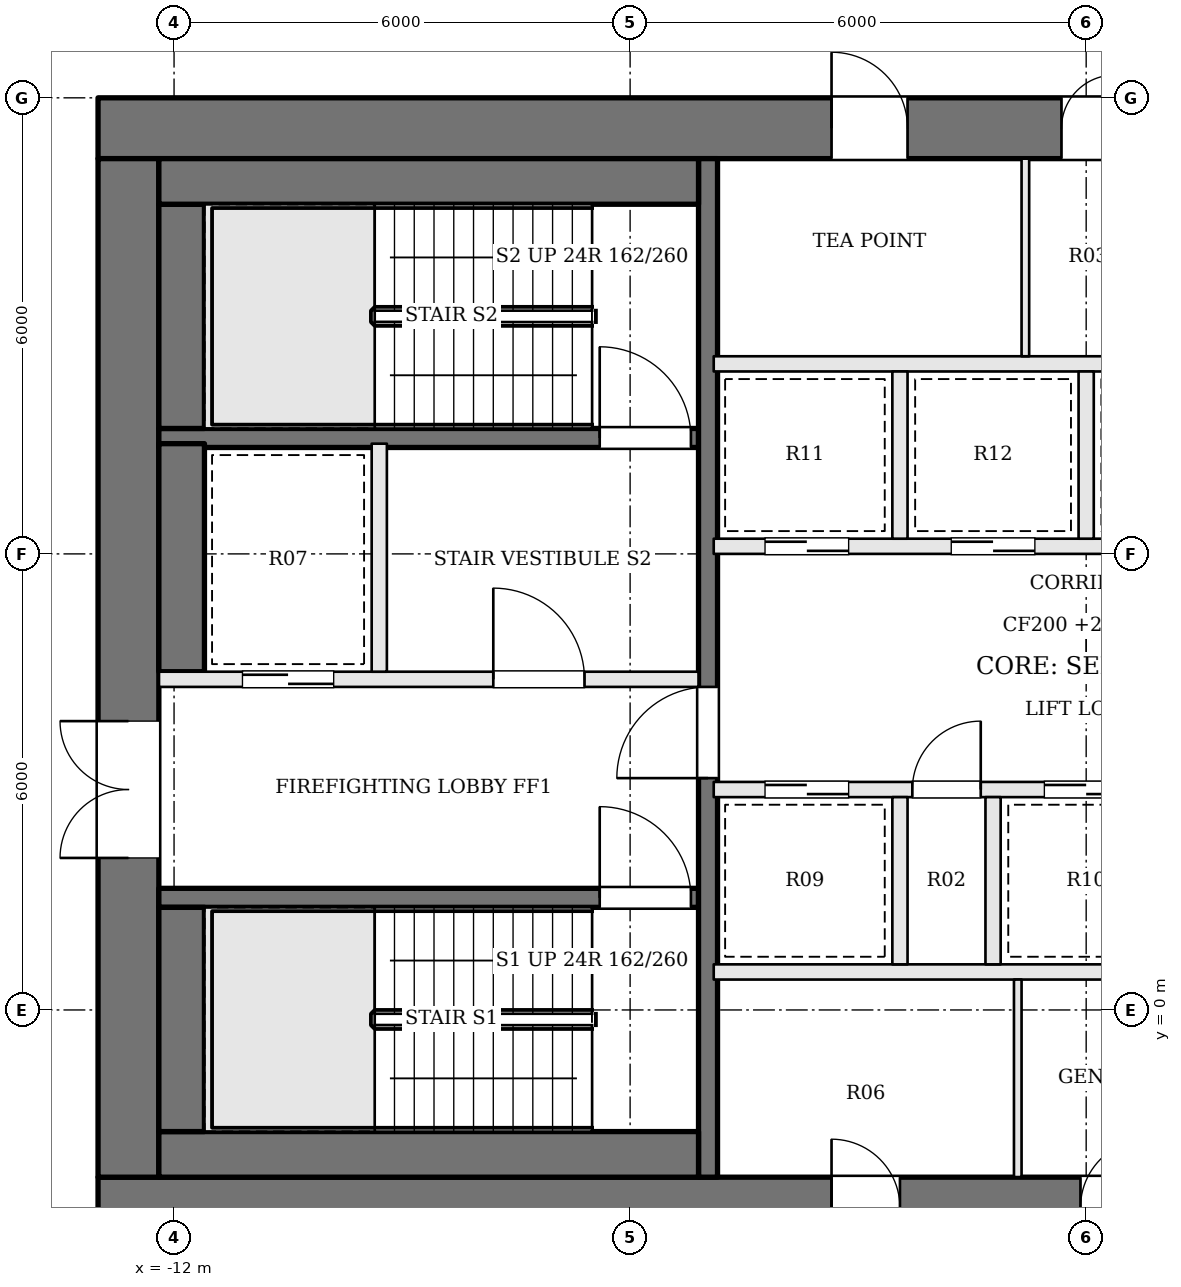
"""IFC4 building model, lengths in metres.
Left out: names, types, materials, properties, quantities, classifications, styles, units other than length and angle.
Written with IfcOpenShell. Run it as: python <this file> out.ifc"""

import sys

from ifc_helpers import new_model, si_unit, direction, frame, frame_2d, origin, place, context, subcontext, project, spatial, rectangle, extrude, element, fill, save


model = new_model("IFC4")
c1 = context("Model", 3, precision=1e-05, world=origin(), true_north=direction((0.0, 1.0)))
c2 = subcontext(c1, "Body", "Model", "MODEL_VIEW")
j1 = project(units=[si_unit("LENGTHUNIT", "METRE"), si_unit("PLANEANGLEUNIT", "RADIAN")], contexts=[c1])
p1 = place(None, origin())
s1 = spatial("IfcSite", under=j1, at=p1, CompositionType="ELEMENT")
p2 = place(p1, origin())
s2 = spatial("IfcBuilding", under=s1, at=p2, CompositionType="ELEMENT")
p3 = place(p2, frame((0.0, 0.0, 252.6)))
s3 = spatial("IfcBuildingStorey", under=s2, at=p3, CompositionType="ELEMENT", Elevation=252.6)
p4 = place(p3, frame((-13.0, 11.6, 0.0), z_axis=(0.0, 0.0, 1.0), x_axis=(1.0, 0.0, 0.0)))
e1 = element("IfcWall", 1, at=p4, inside=s3, PredefinedType="SHEAR", context=c2, shape_type="SweptSolid", body=[
    extrude(rectangle(XDim=26.0, YDim=0.8, at=frame_2d((13.0, 0.0))), origin(), (0.0, 0.0, 1.0), 3.9),
])
p5 = place(p4, frame((9.65, 0.0, 0.0)))
e2 = element("IfcOpeningElement", 2, at=p5, cuts=e1, PredefinedType="OPENING", context=c2, shape_type="SweptSolid", body=[
    extrude(rectangle(XDim=1.0, YDim=2.1, at=frame_2d((0.5, 1.05))), frame((0.0, 0.41, 0.0), z_axis=(0.0, -1.0, 0.0), x_axis=(1.0, 0.0, 0.0)), (0.0, 0.0, 1.0), 0.82),
])
p6 = place(p4, frame((12.675, 0.0, 0.0)))
e3 = element("IfcOpeningElement", 3, at=p6, cuts=e1, PredefinedType="OPENING", context=c2, shape_type="SweptSolid", body=[
    extrude(rectangle(XDim=0.7, YDim=2.1, at=frame_2d((0.35, 1.05))), frame((0.0, 0.41, 0.0), z_axis=(0.0, -1.0, 0.0), x_axis=(1.0, 0.0, 0.0)), (0.0, 0.0, 1.0), 0.82),
])
p7 = place(p4, frame((14.725, 0.0, 0.0)))
e4 = element("IfcOpeningElement", 4, at=p7, cuts=e1, PredefinedType="OPENING", context=c2, shape_type="SweptSolid", body=[
    extrude(rectangle(XDim=0.7, YDim=2.1, at=frame_2d((0.35, 1.05))), frame((0.0, 0.41, 0.0), z_axis=(0.0, -1.0, 0.0), x_axis=(1.0, 0.0, 0.0)), (0.0, 0.0, 1.0), 0.82),
])
p8 = place(p4, frame((16.6, 0.0, 0.0)))
e5 = element("IfcOpeningElement", 5, at=p8, cuts=e1, PredefinedType="OPENING", context=c2, shape_type="SweptSolid", body=[
    extrude(rectangle(XDim=1.0, YDim=2.1, at=frame_2d((0.5, 1.05))), frame((0.0, 0.41, 0.0), z_axis=(0.0, -1.0, 0.0), x_axis=(1.0, 0.0, 0.0)), (0.0, 0.0, 1.0), 0.82),
])
p9 = place(p3, frame((-13.0, -2.6, 0.0), z_axis=(0.0, 0.0, 1.0), x_axis=(1.0, 0.0, 0.0)))
e6 = element("IfcWall", 6, at=p9, inside=s3, PredefinedType="SHEAR", context=c2, shape_type="SweptSolid", body=[
    extrude(rectangle(XDim=26.0, YDim=0.8, at=frame_2d((13.0, 0.0))), origin(), (0.0, 0.0, 1.0), 3.9),
])
p10 = place(p9, frame((9.65, 0.0, 0.0)))
e7 = element("IfcOpeningElement", 7, at=p10, cuts=e6, PredefinedType="OPENING", context=c2, shape_type="SweptSolid", body=[
    extrude(rectangle(XDim=0.9, YDim=2.1, at=frame_2d((0.45, 1.05))), frame((0.0, 0.41, 0.0), z_axis=(0.0, -1.0, 0.0), x_axis=(1.0, 0.0, 0.0)), (0.0, 0.0, 1.0), 0.82),
])
p11 = place(p9, frame((12.925, 0.0, 0.0)))
e8 = element("IfcOpeningElement", 8, at=p11, cuts=e6, PredefinedType="OPENING", context=c2, shape_type="SweptSolid", body=[
    extrude(rectangle(XDim=0.9, YDim=2.1, at=frame_2d((0.45, 1.05))), frame((0.0, 0.41, 0.0), z_axis=(0.0, -1.0, 0.0), x_axis=(1.0, 0.0, 0.0)), (0.0, 0.0, 1.0), 0.82),
])
p12 = place(p9, frame((15.05, 0.0, 0.0)))
e9 = element("IfcOpeningElement", 9, at=p12, cuts=e6, PredefinedType="OPENING", context=c2, shape_type="SweptSolid", body=[
    extrude(rectangle(XDim=1.0, YDim=2.1, at=frame_2d((0.5, 1.05))), frame((0.0, 0.41, 0.0), z_axis=(0.0, -1.0, 0.0), x_axis=(1.0, 0.0, 0.0)), (0.0, 0.0, 1.0), 0.82),
])
p13 = place(p9, frame((16.825, 0.0, 0.0)))
e10 = element("IfcOpeningElement", 10, at=p13, cuts=e6, PredefinedType="OPENING", context=c2, shape_type="SweptSolid", body=[
    extrude(rectangle(XDim=0.7, YDim=2.1, at=frame_2d((0.35, 1.05))), frame((0.0, 0.41, 0.0), z_axis=(0.0, -1.0, 0.0), x_axis=(1.0, 0.0, 0.0)), (0.0, 0.0, 1.0), 0.82),
])
p14 = place(p3, frame((-12.6, -2.2, 0.0), z_axis=(0.0, 0.0, 1.0), x_axis=(0.0, 1.0, 0.0)))
e11 = element("IfcWall", 11, at=p14, inside=s3, PredefinedType="SHEAR", context=c2, shape_type="SweptSolid", body=[
    extrude(rectangle(XDim=13.4, YDim=0.8, at=frame_2d((6.7, 0.0))), origin(), (0.0, 0.0, 1.0), 3.9),
])
p15 = place(p14, frame((4.2, 0.0, 0.0)))
e12 = element("IfcOpeningElement", 12, at=p15, cuts=e11, PredefinedType="OPENING", context=c2, shape_type="SweptSolid", body=[
    extrude(rectangle(XDim=1.8, YDim=2.1, at=frame_2d((0.9, 1.05))), frame((0.0, 0.41, 0.0), z_axis=(0.0, -1.0, 0.0), x_axis=(1.0, 0.0, 0.0)), (0.0, 0.0, 1.0), 0.82),
])
p16 = place(p3, frame((-12.2, 1.475, 0.0), z_axis=(0.0, 0.0, 1.0), x_axis=(1.0, 0.0, 0.0)))
e13 = element("IfcWall", 13, at=p16, inside=s3, PredefinedType="SOLIDWALL", context=c2, shape_type="SweptSolid", body=[
    extrude(rectangle(XDim=7.1, YDim=0.25, at=frame_2d((3.55, 0.0))), origin(), (0.0, 0.0, 1.0), 3.7),
])
p17 = place(p16, frame((5.8, 0.0, 0.0)))
e14 = element("IfcOpeningElement", 14, at=p17, cuts=e13, PredefinedType="OPENING", context=c2, shape_type="SweptSolid", body=[
    extrude(rectangle(XDim=1.2, YDim=2.1, at=frame_2d((0.6, 1.05))), frame((0.0, 0.135, 0.0), z_axis=(0.0, -1.0, 0.0), x_axis=(1.0, 0.0, 0.0)), (0.0, 0.0, 1.0), 0.27),
])
p18 = place(p3, frame((-12.2, 4.35, 0.0), z_axis=(0.0, 0.0, 1.0), x_axis=(1.0, 0.0, 0.0)))
e15 = element("IfcWall", 15, at=p18, inside=s3, PredefinedType="SOLIDWALL", context=c2, shape_type="SweptSolid", body=[
    extrude(rectangle(XDim=7.1, YDim=0.2, at=frame_2d((3.55, 0.0))), origin(), (0.0, 0.0, 1.0), 3.7),
])
p19 = place(p18, frame((4.4, 0.0, 0.0)))
e16 = element("IfcOpeningElement", 16, at=p19, cuts=e15, PredefinedType="OPENING", context=c2, shape_type="SweptSolid", body=[
    extrude(rectangle(XDim=1.2, YDim=2.1, at=frame_2d((0.6, 1.05))), frame((0.0, 0.11, 0.0), z_axis=(0.0, -1.0, 0.0), x_axis=(1.0, 0.0, 0.0)), (0.0, 0.0, 1.0), 0.22),
])
p20 = place(p18, frame((1.1, 0.0, 0.0)))
e17 = element("IfcOpeningElement", 17, at=p20, cuts=e15, PredefinedType="OPENING", context=c2, shape_type="SweptSolid", body=[
    extrude(rectangle(XDim=1.2, YDim=2.1, at=frame_2d((0.6, 1.05))), frame((0.0, 0.11, 0.0), z_axis=(0.0, -1.0, 0.0), x_axis=(1.0, 0.0, 0.0)), (0.0, 0.0, 1.0), 0.22),
])
p21 = place(p3, frame((-12.2, 7.525, 0.0), z_axis=(0.0, 0.0, 1.0), x_axis=(1.0, 0.0, 0.0)))
e18 = element("IfcWall", 18, at=p21, inside=s3, PredefinedType="SOLIDWALL", context=c2, shape_type="SweptSolid", body=[
    extrude(rectangle(XDim=7.1, YDim=0.25, at=frame_2d((3.55, 0.0))), origin(), (0.0, 0.0, 1.0), 3.7),
])
p22 = place(p21, frame((5.8, 0.0, 0.0)))
e19 = element("IfcOpeningElement", 19, at=p22, cuts=e18, PredefinedType="OPENING", context=c2, shape_type="SweptSolid", body=[
    extrude(rectangle(XDim=1.2, YDim=2.1, at=frame_2d((0.6, 1.05))), frame((0.0, 0.135, 0.0), z_axis=(0.0, -1.0, 0.0), x_axis=(1.0, 0.0, 0.0)), (0.0, 0.0, 1.0), 0.27),
])
p23 = place(p3, frame((-9.3, 4.45, 0.0), z_axis=(0.0, 0.0, 1.0), x_axis=(0.0, 1.0, 0.0)))
e20 = element("IfcWall", 20, at=p23, inside=s3, PredefinedType="SOLIDWALL", context=c2, shape_type="SweptSolid", body=[
    extrude(rectangle(XDim=3.0, YDim=0.2, at=frame_2d((1.5, 0.0))), origin(), (0.0, 0.0, 1.0), 3.7),
])
p24 = place(p3, frame((-4.975, -2.2, 0.0), z_axis=(0.0, 0.0, 1.0), x_axis=(0.0, 1.0, 0.0)))
e21 = element("IfcWall", 21, at=p24, inside=s3, PredefinedType="SOLIDWALL", context=c2, shape_type="SweptSolid", body=[
    extrude(rectangle(XDim=13.4, YDim=0.25, at=frame_2d((6.7, 0.0))), origin(), (0.0, 0.0, 1.0), 3.7),
])
p25 = place(p24, frame((5.25, 0.0, 0.0)))
e22 = element("IfcOpeningElement", 22, at=p25, cuts=e21, PredefinedType="OPENING", context=c2, shape_type="SweptSolid", body=[
    extrude(rectangle(XDim=1.2, YDim=2.1, at=frame_2d((0.6, 1.05))), frame((0.0, 0.135, 0.0), z_axis=(0.0, -1.0, 0.0), x_axis=(1.0, 0.0, 0.0)), (0.0, 0.0, 1.0), 0.27),
])
p26 = place(p3, frame((-12.2, -1.9, 0.0), z_axis=(0.0, 0.0, 1.0), x_axis=(1.0, 0.0, 0.0)))
e23 = element("IfcWall", 23, at=p26, inside=s3, PredefinedType="SOLIDWALL", context=c2, shape_type="SweptSolid", body=[
    extrude(rectangle(XDim=7.1, YDim=0.6, at=frame_2d((3.55, 0.0))), origin(), (0.0, 0.0, 1.0), 3.7),
])
p27 = place(p3, frame((-11.9, -1.6, 0.0), z_axis=(0.0, 0.0, 1.0), x_axis=(0.0, 1.0, 0.0)))
e24 = element("IfcWall", 24, at=p27, inside=s3, PredefinedType="SOLIDWALL", context=c2, shape_type="SweptSolid", body=[
    extrude(rectangle(XDim=2.95, YDim=0.6, at=frame_2d((1.475, 0.0))), origin(), (0.0, 0.0, 1.0), 3.7),
])
p28 = place(p3, frame((-11.9, 4.45, 0.0), z_axis=(0.0, 0.0, 1.0), x_axis=(0.0, 1.0, 0.0)))
e25 = element("IfcWall", 25, at=p28, inside=s3, PredefinedType="SOLIDWALL", context=c2, shape_type="SweptSolid", body=[
    extrude(rectangle(XDim=3.0, YDim=0.6, at=frame_2d((1.5, 0.0))), origin(), (0.0, 0.0, 1.0), 3.7),
])
p29 = place(p3, frame((-11.9, 7.65, 0.0), z_axis=(0.0, 0.0, 1.0), x_axis=(0.0, 1.0, 0.0)))
e26 = element("IfcWall", 26, at=p29, inside=s3, PredefinedType="SOLIDWALL", context=c2, shape_type="SweptSolid", body=[
    extrude(rectangle(XDim=2.95, YDim=0.6, at=frame_2d((1.475, 0.0))), origin(), (0.0, 0.0, 1.0), 3.7),
])
p30 = place(p3, frame((-12.2, 10.9, 0.0), z_axis=(0.0, 0.0, 1.0), x_axis=(1.0, 0.0, 0.0)))
e27 = element("IfcWall", 27, at=p30, inside=s3, PredefinedType="SOLIDWALL", context=c2, shape_type="SweptSolid", body=[
    extrude(rectangle(XDim=7.1, YDim=0.6, at=frame_2d((3.55, 0.0))), origin(), (0.0, 0.0, 1.0), 3.7),
])
p31 = place(p3, frame((-4.9, 0.5, 0.0), z_axis=(0.0, 0.0, 1.0), x_axis=(1.0, 0.0, 0.0)))
e28 = element("IfcWall", 28, at=p31, inside=s3, PredefinedType="SOLIDWALL", context=c2, shape_type="SweptSolid", body=[
    extrude(rectangle(XDim=9.8, YDim=0.2, at=frame_2d((4.9, 0.0))), origin(), (0.0, 0.0, 1.0), 3.7),
])
p32 = place(p3, frame((-4.9, 2.9, 0.0), z_axis=(0.0, 0.0, 1.0), x_axis=(1.0, 0.0, 0.0)))
e29 = element("IfcWall", 29, at=p32, inside=s3, PredefinedType="SOLIDWALL", context=c2, shape_type="SweptSolid", body=[
    extrude(rectangle(XDim=9.8, YDim=0.2, at=frame_2d((4.9, 0.0))), origin(), (0.0, 0.0, 1.0), 3.7),
])
p33 = place(p32, frame((0.675, 0.0, 0.0)))
e30 = element("IfcOpeningElement", 30, at=p33, cuts=e29, PredefinedType="OPENING", context=c2, shape_type="SweptSolid", body=[
    extrude(rectangle(XDim=1.1, YDim=2.1, at=frame_2d((0.55, 1.05))), frame((0.0, 0.11, 0.0), z_axis=(0.0, -1.0, 0.0), x_axis=(1.0, 0.0, 0.0)), (0.0, 0.0, 1.0), 0.22),
])
p34 = place(p32, frame((2.613, 0.0, 0.0)))
e31 = element("IfcOpeningElement", 31, at=p34, cuts=e29, PredefinedType="OPENING", context=c2, shape_type="SweptSolid", body=[
    extrude(rectangle(XDim=0.9, YDim=2.1, at=frame_2d((0.45, 1.05))), frame((0.0, 0.11, 0.0), z_axis=(0.0, -1.0, 0.0), x_axis=(1.0, 0.0, 0.0)), (0.0, 0.0, 1.0), 0.22),
])
p35 = place(p32, frame((4.35, 0.0, 0.0)))
e32 = element("IfcOpeningElement", 32, at=p35, cuts=e29, PredefinedType="OPENING", context=c2, shape_type="SweptSolid", body=[
    extrude(rectangle(XDim=1.1, YDim=2.1, at=frame_2d((0.55, 1.05))), frame((0.0, 0.11, 0.0), z_axis=(0.0, -1.0, 0.0), x_axis=(1.0, 0.0, 0.0)), (0.0, 0.0, 1.0), 0.22),
])
p36 = place(p32, frame((7.463, 0.0, 0.0)))
e33 = element("IfcOpeningElement", 33, at=p36, cuts=e29, PredefinedType="OPENING", context=c2, shape_type="SweptSolid", body=[
    extrude(rectangle(XDim=1.0, YDim=2.1, at=frame_2d((0.5, 1.05))), frame((0.0, 0.11, 0.0), z_axis=(0.0, -1.0, 0.0), x_axis=(1.0, 0.0, 0.0)), (0.0, 0.0, 1.0), 0.22),
])
p37 = place(p3, frame((-4.9, 6.1, 0.0), z_axis=(0.0, 0.0, 1.0), x_axis=(1.0, 0.0, 0.0)))
e34 = element("IfcWall", 34, at=p37, inside=s3, PredefinedType="SOLIDWALL", context=c2, shape_type="SweptSolid", body=[
    extrude(rectangle(XDim=9.8, YDim=0.2, at=frame_2d((4.9, 0.0))), origin(), (0.0, 0.0, 1.0), 3.7),
])
p38 = place(p37, frame((0.675, 0.0, 0.0)))
e35 = element("IfcOpeningElement", 35, at=p38, cuts=e34, PredefinedType="OPENING", context=c2, shape_type="SweptSolid", body=[
    extrude(rectangle(XDim=1.1, YDim=2.1, at=frame_2d((0.55, 1.05))), frame((0.0, 0.11, 0.0), z_axis=(0.0, -1.0, 0.0), x_axis=(1.0, 0.0, 0.0)), (0.0, 0.0, 1.0), 0.22),
])
p39 = place(p37, frame((3.125, 0.0, 0.0)))
e36 = element("IfcOpeningElement", 36, at=p39, cuts=e34, PredefinedType="OPENING", context=c2, shape_type="SweptSolid", body=[
    extrude(rectangle(XDim=1.1, YDim=2.1, at=frame_2d((0.55, 1.05))), frame((0.0, 0.11, 0.0), z_axis=(0.0, -1.0, 0.0), x_axis=(1.0, 0.0, 0.0)), (0.0, 0.0, 1.0), 0.22),
])
p40 = place(p37, frame((5.575, 0.0, 0.0)))
e37 = element("IfcOpeningElement", 37, at=p40, cuts=e34, PredefinedType="OPENING", context=c2, shape_type="SweptSolid", body=[
    extrude(rectangle(XDim=1.1, YDim=2.1, at=frame_2d((0.55, 1.05))), frame((0.0, 0.11, 0.0), z_axis=(0.0, -1.0, 0.0), x_axis=(1.0, 0.0, 0.0)), (0.0, 0.0, 1.0), 0.22),
])
p41 = place(p37, frame((8.025, 0.0, 0.0)))
e38 = element("IfcOpeningElement", 38, at=p41, cuts=e34, PredefinedType="OPENING", context=c2, shape_type="SweptSolid", body=[
    extrude(rectangle(XDim=1.1, YDim=2.1, at=frame_2d((0.55, 1.05))), frame((0.0, 0.11, 0.0), z_axis=(0.0, -1.0, 0.0), x_axis=(1.0, 0.0, 0.0)), (0.0, 0.0, 1.0), 0.22),
])
p42 = place(p3, frame((-4.9, 8.5, 0.0), z_axis=(0.0, 0.0, 1.0), x_axis=(1.0, 0.0, 0.0)))
e39 = element("IfcWall", 39, at=p42, inside=s3, PredefinedType="SOLIDWALL", context=c2, shape_type="SweptSolid", body=[
    extrude(rectangle(XDim=9.8, YDim=0.2, at=frame_2d((4.9, 0.0))), origin(), (0.0, 0.0, 1.0), 3.7),
])
for number, where, z_axis, x_axis in (
    (40, (-2.45, 0.6, 0.0), (0.0, 0.0, 1.0), (0.0, 1.0, 0.0)),
    (41, (-1.225, 0.6, 0.0), (0.0, 0.0, 1.0), (0.0, 1.0, 0.0)),
    (42, (-2.45, 6.2, 0.0), (0.0, 0.0, 1.0), (0.0, 1.0, 0.0)),
    (43, (0.0, 6.2, 0.0), (0.0, 0.0, 1.0), (0.0, 1.0, 0.0)),
):
    element("IfcWall", number, at=place(p3, frame(where, z_axis=z_axis, x_axis=x_axis)), inside=s3, PredefinedType="SOLIDWALL", context=c2, shape_type="SweptSolid", body=[
        extrude(rectangle(XDim=2.2, YDim=0.2, at=frame_2d((1.1, 0.0))), origin(), (0.0, 0.0, 1.0), 3.7),
    ])
for number, where, z_axis, x_axis in (
    (44, (-0.9, -2.2, 0.0), (0.0, 0.0, 1.0), (0.0, 1.0, 0.0)),
    (45, (-0.8, 8.6, 0.0), (0.0, 0.0, 1.0), (0.0, 1.0, 0.0)),
):
    element("IfcWall", number, at=place(p3, frame(where, z_axis=z_axis, x_axis=x_axis)), inside=s3, PredefinedType="PARTITIONING", context=c2, shape_type="SweptSolid", body=[
        extrude(rectangle(XDim=2.6, YDim=0.1, at=frame_2d((1.3, 0.0))), origin(), (0.0, 0.0, 1.0), 3.7),
    ])
p43 = place(p15, origin())
e46 = element("IfcDoor", 46, at=p43, inside=s3, OperationType="DOUBLE_DOOR_SINGLE_SWING", PredefinedType="DOOR", context=c2, shape_type="SweptSolid", body=[
    extrude(rectangle(XDim=1.8, YDim=2.1, at=frame_2d((0.9, 1.05))), frame((0.0, 0.025, 0.0), z_axis=(0.0, -1.0, 0.0), x_axis=(1.0, 0.0, 0.0)), (0.0, 0.0, 1.0), 0.05),
])
fill(e12, e46)
p44 = place(p25, origin())
e47 = element("IfcDoor", 47, at=p44, inside=s3, OperationType="SINGLE_SWING_LEFT", PredefinedType="DOOR", context=c2, shape_type="SweptSolid", body=[
    extrude(rectangle(XDim=1.2, YDim=2.1, at=frame_2d((0.6, 1.05))), frame((0.0, 0.025, 0.0), z_axis=(0.0, -1.0, 0.0), x_axis=(1.0, 0.0, 0.0)), (0.0, 0.0, 1.0), 0.05),
])
fill(e22, e47)
p45 = place(p19, origin())
e48 = element("IfcDoor", 48, at=p45, inside=s3, OperationType="SINGLE_SWING_LEFT", PredefinedType="DOOR", context=c2, shape_type="SweptSolid", body=[
    extrude(rectangle(XDim=1.2, YDim=2.1, at=frame_2d((0.6, 1.05))), frame((0.0, 0.025, 0.0), z_axis=(0.0, -1.0, 0.0), x_axis=(1.0, 0.0, 0.0)), (0.0, 0.0, 1.0), 0.05),
])
fill(e16, e48)
p46 = place(p17, origin())
e49 = element("IfcDoor", 49, at=p46, inside=s3, OperationType="SINGLE_SWING_LEFT", PredefinedType="DOOR", context=c2, shape_type="SweptSolid", body=[
    extrude(rectangle(XDim=1.2, YDim=2.1, at=frame_2d((0.6, 1.05))), frame((0.0, 0.025, 0.0), z_axis=(0.0, -1.0, 0.0), x_axis=(1.0, 0.0, 0.0)), (0.0, 0.0, 1.0), 0.05),
])
fill(e14, e49)
p47 = place(p22, origin())
e50 = element("IfcDoor", 50, at=p47, inside=s3, OperationType="SINGLE_SWING_LEFT", PredefinedType="DOOR", context=c2, shape_type="SweptSolid", body=[
    extrude(rectangle(XDim=1.2, YDim=2.1, at=frame_2d((0.6, 1.05))), frame((0.0, 0.025, 0.0), z_axis=(0.0, -1.0, 0.0), x_axis=(1.0, 0.0, 0.0)), (0.0, 0.0, 1.0), 0.05),
])
fill(e19, e50)
p48 = place(p20, origin())
e51 = element("IfcDoor", 51, at=p48, inside=s3, OperationType="SLIDING_TO_RIGHT", PredefinedType="DOOR", context=c2, shape_type="SweptSolid", body=[
    extrude(rectangle(XDim=1.2, YDim=2.1, at=frame_2d((0.6, 1.05))), frame((0.0, 0.025, 0.0), z_axis=(0.0, -1.0, 0.0), x_axis=(1.0, 0.0, 0.0)), (0.0, 0.0, 1.0), 0.05),
])
fill(e17, e51)
p49 = place(p33, origin())
e52 = element("IfcDoor", 52, at=p49, inside=s3, OperationType="SLIDING_TO_RIGHT", PredefinedType="DOOR", context=c2, shape_type="SweptSolid", body=[
    extrude(rectangle(XDim=1.1, YDim=2.1, at=frame_2d((0.55, 1.05))), frame((0.0, 0.025, 0.0), z_axis=(0.0, -1.0, 0.0), x_axis=(1.0, 0.0, 0.0)), (0.0, 0.0, 1.0), 0.05),
])
fill(e30, e52)
p50 = place(p34, origin())
e53 = element("IfcDoor", 53, at=p50, inside=s3, OperationType="SINGLE_SWING_RIGHT", PredefinedType="DOOR", context=c2, shape_type="SweptSolid", body=[
    extrude(rectangle(XDim=0.9, YDim=2.1, at=frame_2d((0.45, 1.05))), frame((0.0, 0.025, 0.0), z_axis=(0.0, -1.0, 0.0), x_axis=(1.0, 0.0, 0.0)), (0.0, 0.0, 1.0), 0.05),
])
fill(e31, e53)
p51 = place(p35, origin())
e54 = element("IfcDoor", 54, at=p51, inside=s3, OperationType="SLIDING_TO_LEFT", PredefinedType="DOOR", context=c2, shape_type="SweptSolid", body=[
    extrude(rectangle(XDim=1.1, YDim=2.1, at=frame_2d((0.55, 1.05))), frame((0.0, 0.025, 0.0), z_axis=(0.0, -1.0, 0.0), x_axis=(1.0, 0.0, 0.0)), (0.0, 0.0, 1.0), 0.05),
])
fill(e32, e54)
p52 = place(p38, origin())
e55 = element("IfcDoor", 55, at=p52, inside=s3, OperationType="SLIDING_TO_RIGHT", PredefinedType="DOOR", context=c2, shape_type="SweptSolid", body=[
    extrude(rectangle(XDim=1.1, YDim=2.1, at=frame_2d((0.55, 1.05))), frame((0.0, 0.025, 0.0), z_axis=(0.0, -1.0, 0.0), x_axis=(1.0, 0.0, 0.0)), (0.0, 0.0, 1.0), 0.05),
])
fill(e35, e55)
p53 = place(p39, origin())
e56 = element("IfcDoor", 56, at=p53, inside=s3, OperationType="SLIDING_TO_LEFT", PredefinedType="DOOR", context=c2, shape_type="SweptSolid", body=[
    extrude(rectangle(XDim=1.1, YDim=2.1, at=frame_2d((0.55, 1.05))), frame((0.0, 0.025, 0.0), z_axis=(0.0, -1.0, 0.0), x_axis=(1.0, 0.0, 0.0)), (0.0, 0.0, 1.0), 0.05),
])
fill(e36, e56)
p54 = place(p10, origin())
e57 = element("IfcDoor", 57, at=p54, inside=s3, OperationType="SINGLE_SWING_LEFT", PredefinedType="DOOR", context=c2, shape_type="SweptSolid", body=[
    extrude(rectangle(XDim=0.9, YDim=2.1, at=frame_2d((0.45, 1.05))), frame((0.0, 0.025, 0.0), z_axis=(0.0, -1.0, 0.0), x_axis=(1.0, 0.0, 0.0)), (0.0, 0.0, 1.0), 0.05),
])
fill(e7, e57)
p55 = place(p11, origin())
e58 = element("IfcDoor", 58, at=p55, inside=s3, OperationType="SINGLE_SWING_RIGHT", PredefinedType="DOOR", context=c2, shape_type="SweptSolid", body=[
    extrude(rectangle(XDim=0.9, YDim=2.1, at=frame_2d((0.45, 1.05))), frame((0.0, 0.025, 0.0), z_axis=(0.0, -1.0, 0.0), x_axis=(1.0, 0.0, 0.0)), (0.0, 0.0, 1.0), 0.05),
])
fill(e8, e58)
p56 = place(p5, origin())
e59 = element("IfcDoor", 59, at=p56, inside=s3, OperationType="SINGLE_SWING_LEFT", PredefinedType="DOOR", context=c2, shape_type="SweptSolid", body=[
    extrude(rectangle(XDim=1.0, YDim=2.1, at=frame_2d((0.5, 1.05))), frame((0.0, 0.025, 0.0), z_axis=(0.0, -1.0, 0.0), x_axis=(1.0, 0.0, 0.0)), (0.0, 0.0, 1.0), 0.05),
])
fill(e2, e59)
p57 = place(p6, origin())
e60 = element("IfcDoor", 60, at=p57, inside=s3, OperationType="SINGLE_SWING_RIGHT", PredefinedType="DOOR", context=c2, shape_type="SweptSolid", body=[
    extrude(rectangle(XDim=0.7, YDim=2.1, at=frame_2d((0.35, 1.05))), frame((0.0, 0.025, 0.0), z_axis=(0.0, -1.0, 0.0), x_axis=(1.0, 0.0, 0.0)), (0.0, 0.0, 1.0), 0.05),
])
fill(e3, e60)
save(model, sys.argv[1])
